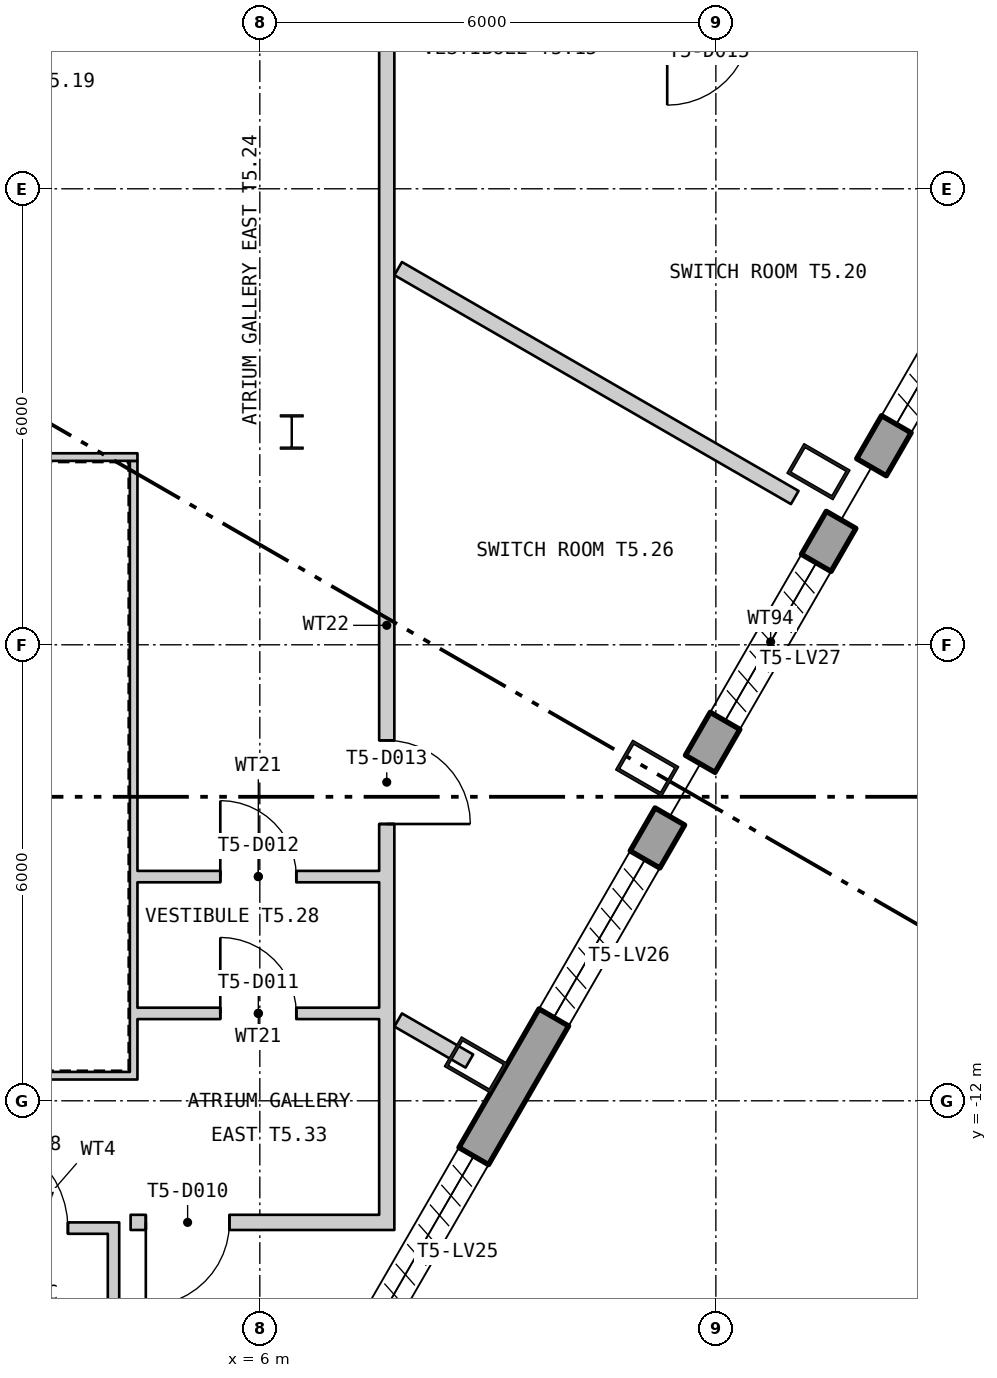
"""IFC4 building model, lengths in metres.
Left out: names, types, materials, properties, quantities, classifications, styles, units other than length and angle.
Written with IfcOpenShell. Run it as: python <this file> out.ifc"""

import sys

from ifc_helpers import new_model, si_unit, direction, frame, frame_2d, origin, origin_2d, place, context, subcontext, project, spatial, polyline, rectangle, hollow_rectangle, i_section, outline, extrude, element, fill, save


model = new_model("IFC4")
c1 = context("Model", 3, precision=1e-05, world=origin(), true_north=direction((0.0, 1.0)))
c2 = subcontext(c1, "Body", "Model", "MODEL_VIEW")
j1 = project(units=[si_unit("LENGTHUNIT", "METRE"), si_unit("PLANEANGLEUNIT", "RADIAN")], contexts=[c1])
p1 = place(None, origin())
s1 = spatial("IfcSite", under=j1, at=p1, CompositionType="ELEMENT")
p2 = place(p1, origin())
s2 = spatial("IfcBuilding", under=s1, at=p2, CompositionType="ELEMENT")
p3 = place(p2, frame((0.0, 0.0, 292.2)))
s3 = spatial("IfcBuildingStorey", under=s2, at=p3, CompositionType="ELEMENT", Elevation=292.2)
for number, where, z_axis, x_axis in (
    (1, (8.843, -11.528, 0.0), (0.0, 0.0, 1.0), (0.5, 0.866, 0.0)),
    (2, (11.096, -7.625, 0.0), (0.0, 0.0, 1.0), (0.5, 0.866, 0.0)),
    (3, (13.35, -3.722, 0.0), (0.0, 0.0, 1.0), (0.5, 0.866, 0.0)),
):
    element("IfcColumn", number, at=place(p3, frame(where, z_axis=z_axis, x_axis=x_axis)), inside=s3, PredefinedType="COLUMN", context=c2, shape_type="SweptSolid", body=[
        extrude(hollow_rectangle(XDim=0.45, YDim=0.7, WallThickness=0.04, at=origin_2d()), origin(), (0.0, 0.0, 1.0), 6.0),
    ])
p4 = place(p3, frame((6.42, -3.2, 0.0), z_axis=(0.0, 0.0, 1.0), x_axis=(1.0, 0.0, 0.0)))
e4 = element("IfcColumn", 4, at=p4, inside=s3, PredefinedType="COLUMN", context=c2, shape_type="SweptSolid", body=[
    extrude(i_section(OverallWidth=0.3, OverallDepth=0.45, WebThickness=0.014, FlangeThickness=0.026, at=origin_2d()), origin(), (0.0, 0.0, 1.0), 6.0),
])
p5 = place(p3, frame((2.415, -23.812, -0.18), z_axis=(0.0, 0.0, 1.0), x_axis=(0.499998326906, 0.866026369744, 0.0)))
e5 = element("IfcWall", 5, at=p5, inside=s3, PredefinedType="SOLIDWALL", context=c2, shape_type="SweptSolid", body=[
    extrude(outline(polyline([(-0.13, -0.225), (17.959, -0.225), (17.959, 0.225), (0.13, 0.225), (-0.13, -0.225)])), origin(), (0.0, 0.0, 1.0), 5.9),
])
p6 = place(p5, frame((1.424, 0.0, 1.38)))
e6 = element("IfcOpeningElement", 6, at=p6, cuts=e5, PredefinedType="OPENING", context=c2, shape_type="SweptSolid", body=[
    extrude(rectangle(XDim=2.4, YDim=3.6, at=frame_2d((1.2, 1.8))), frame((0.0, 0.235, 0.0), z_axis=(0.0, -1.0, 0.0), x_axis=(1.0, 0.0, 0.0)), (0.0, 0.0, 1.0), 0.47),
])
p7 = place(p5, frame((5.892, 0.0, 1.38)))
e7 = element("IfcOpeningElement", 7, at=p7, cuts=e5, PredefinedType="OPENING", context=c2, shape_type="SweptSolid", body=[
    extrude(rectangle(XDim=2.4, YDim=3.6, at=frame_2d((1.2, 1.8))), frame((0.0, 0.235, 0.0), z_axis=(0.0, -1.0, 0.0), x_axis=(1.0, 0.0, 0.0)), (0.0, 0.0, 1.0), 0.47),
])
p8 = place(p5, frame((10.399, 0.0, 1.38)))
e8 = element("IfcOpeningElement", 8, at=p8, cuts=e5, PredefinedType="OPENING", context=c2, shape_type="SweptSolid", body=[
    extrude(rectangle(XDim=2.4, YDim=3.6, at=frame_2d((1.2, 1.8))), frame((0.0, 0.235, 0.0), z_axis=(0.0, -1.0, 0.0), x_axis=(1.0, 0.0, 0.0)), (0.0, 0.0, 1.0), 0.47),
])
p9 = place(p5, frame((14.905, 0.0, 1.38)))
e9 = element("IfcOpeningElement", 9, at=p9, cuts=e5, PredefinedType="OPENING", context=c2, shape_type="SweptSolid", body=[
    extrude(rectangle(XDim=2.4, YDim=3.6, at=frame_2d((1.2, 1.8))), frame((0.0, 0.235, 0.0), z_axis=(0.0, -1.0, 0.0), x_axis=(1.0, 0.0, 0.0)), (0.0, 0.0, 1.0), 0.47),
])
p10 = place(p3, frame((11.794, -7.566, -0.18), z_axis=(0.0, 0.0, 1.0), x_axis=(0.50000114038, 0.866024745385, 0.0)))
e10 = element("IfcWall", 10, at=p10, inside=s3, PredefinedType="SOLIDWALL", context=c2, shape_type="SweptSolid", body=[
    extrude(outline(polyline([(0.0, -0.225), (3.707, -0.225), (3.707, 0.225), (0.0, 0.225), (0.0, -0.225)])), origin(), (0.0, 0.0, 1.0), 5.9),
])
p11 = place(p10, frame((0.653, 0.0, 1.38)))
e11 = element("IfcOpeningElement", 11, at=p11, cuts=e10, PredefinedType="OPENING", context=c2, shape_type="SweptSolid", body=[
    extrude(rectangle(XDim=2.4, YDim=3.6, at=frame_2d((1.2, 1.8))), frame((0.0, 0.235, 0.0), z_axis=(0.0, -1.0, 0.0), x_axis=(1.0, 0.0, 0.0)), (0.0, 0.0, 1.0), 0.47),
])
p12 = place(p3, frame((14.048, -3.663, -0.18), z_axis=(0.0, 0.0, 1.0), x_axis=(0.500002580931, 0.866023913678, 0.0)))
e12 = element("IfcWall", 12, at=p12, inside=s3, PredefinedType="SOLIDWALL", context=c2, shape_type="SweptSolid", body=[
    extrude(outline(polyline([(0.0, -0.225), (22.595, -0.225), (22.335, 0.225), (0.0, 0.225), (0.0, -0.225)])), origin(), (0.0, 0.0, 1.0), 5.9),
])
p13 = place(p12, frame((0.653, 0.0, 1.38)))
e13 = element("IfcOpeningElement", 13, at=p13, cuts=e12, PredefinedType="OPENING", context=c2, shape_type="SweptSolid", body=[
    extrude(rectangle(XDim=2.4, YDim=3.6, at=frame_2d((1.2, 1.8))), frame((0.0, 0.235, 0.0), z_axis=(0.0, -1.0, 0.0), x_axis=(1.0, 0.0, 0.0)), (0.0, 0.0, 1.0), 0.47),
])
p14 = place(p12, frame((5.16, 0.0, 1.38)))
e14 = element("IfcOpeningElement", 14, at=p14, cuts=e12, PredefinedType="OPENING", context=c2, shape_type="SweptSolid", body=[
    extrude(rectangle(XDim=2.4, YDim=3.6, at=frame_2d((1.2, 1.8))), frame((0.0, 0.235, 0.0), z_axis=(0.0, -1.0, 0.0), x_axis=(1.0, 0.0, 0.0)), (0.0, 0.0, 1.0), 0.47),
])
p15 = place(p12, frame((9.667, 0.0, 1.38)))
e15 = element("IfcOpeningElement", 15, at=p15, cuts=e12, PredefinedType="OPENING", context=c2, shape_type="SweptSolid", body=[
    extrude(rectangle(XDim=2.4, YDim=3.6, at=frame_2d((1.2, 1.8))), frame((0.0, 0.235, 0.0), z_axis=(0.0, -1.0, 0.0), x_axis=(1.0, 0.0, 0.0)), (0.0, 0.0, 1.0), 0.47),
])
p16 = place(p12, frame((14.173, 0.0, 1.38)))
e16 = element("IfcOpeningElement", 16, at=p16, cuts=e12, PredefinedType="OPENING", context=c2, shape_type="SweptSolid", body=[
    extrude(rectangle(XDim=2.4, YDim=3.6, at=frame_2d((1.2, 1.8))), frame((0.0, 0.235, 0.0), z_axis=(0.0, -1.0, 0.0), x_axis=(1.0, 0.0, 0.0)), (0.0, 0.0, 1.0), 0.47),
])
p17 = place(p12, frame((18.641, 0.0, 1.38)))
e17 = element("IfcOpeningElement", 17, at=p17, cuts=e12, PredefinedType="OPENING", context=c2, shape_type="SweptSolid", body=[
    extrude(rectangle(XDim=2.4, YDim=3.6, at=frame_2d((1.2, 1.8))), frame((0.0, 0.235, 0.0), z_axis=(0.0, -1.0, 0.0), x_axis=(1.0, 0.0, 0.0)), (0.0, 0.0, 1.0), 0.47),
])
p18 = place(p3, frame((-4.39, -11.67, 0.0), z_axis=(0.0, 0.0, 1.0), x_axis=(1.0, 0.0, 0.0)))
e18 = element("IfcWall", 18, at=p18, inside=s3, PredefinedType="PARTITIONING", context=c2, shape_type="SweptSolid", body=[
    extrude(rectangle(XDim=8.78, YDim=0.1, at=frame_2d((4.39, 0.0))), origin(), (0.0, 0.0, 1.0), 5.7),
])
p19 = place(p3, frame((4.34, -11.62, 0.0), z_axis=(0.0, 0.0, 1.0), x_axis=(0.0, 1.0, 0.0)))
e19 = element("IfcWall", 19, at=p19, inside=s3, PredefinedType="PARTITIONING", context=c2, shape_type="SweptSolid", body=[
    extrude(rectangle(XDim=8.04, YDim=0.1, at=frame_2d((4.02, 0.0))), origin(), (0.0, 0.0, 1.0), 5.7),
])
p20 = place(p3, frame((4.39, -3.53, 0.0), z_axis=(0.0, 0.0, 1.0), x_axis=(-1.0, 0.0, 0.0)))
e20 = element("IfcWall", 20, at=p20, inside=s3, PredefinedType="PARTITIONING", context=c2, shape_type="SweptSolid", body=[
    extrude(rectangle(XDim=8.78, YDim=0.1, at=frame_2d((4.39, 0.0))), origin(), (0.0, 0.0, 1.0), 5.7),
])
p21 = place(p3, frame((4.075, -16.15, 0.0), z_axis=(0.0, 0.0, 1.0), x_axis=(0.0, 1.0, 0.0)))
e21 = element("IfcWall", 21, at=p21, inside=s3, PredefinedType="PARTITIONING", context=c2, shape_type="SweptSolid", body=[
    extrude(rectangle(XDim=2.4, YDim=0.15, at=frame_2d((1.2, 0.0))), origin(), (0.0, 0.0, 1.0), 5.7),
])
p22 = place(p3, frame((1.55, -13.675, 0.0), z_axis=(0.0, 0.0, 1.0), x_axis=(1.0, 0.0, 0.0)))
e22 = element("IfcWall", 22, at=p22, inside=s3, PredefinedType="PARTITIONING", context=c2, shape_type="SweptSolid", body=[
    extrude(rectangle(XDim=2.6, YDim=0.15, at=frame_2d((1.3, 0.0))), origin(), (0.0, 0.0, 1.0), 4.79),
])
p23 = place(p22, frame((0.675, 0.0, 0.0)))
e23 = element("IfcOpeningElement", 23, at=p23, cuts=e22, PredefinedType="OPENING", context=c2, shape_type="SweptSolid", body=[
    extrude(rectangle(XDim=1.25, YDim=2.1, at=frame_2d((0.625, 1.05))), frame((0.0, 0.085, 0.0), z_axis=(0.0, -1.0, 0.0), x_axis=(1.0, 0.0, 0.0)), (0.0, 0.0, 1.0), 0.17),
])
p24 = place(p3, frame((4.3, -13.6, 0.0), z_axis=(0.0, 0.0, 1.0), x_axis=(1.0, 0.0, 0.0)))
e24 = element("IfcWall", 24, at=p24, inside=s3, PredefinedType="PARTITIONING", context=c2, shape_type="SweptSolid", body=[
    extrude(rectangle(XDim=3.27, YDim=0.2, at=frame_2d((1.635, 0.0))), origin(), (0.0, 0.0, 1.0), 4.79),
])
p25 = place(p24, frame((0.2, 0.0, 0.0)))
e25 = element("IfcOpeningElement", 25, at=p25, cuts=e24, PredefinedType="OPENING", context=c2, shape_type="SweptSolid", body=[
    extrude(rectangle(XDim=1.1, YDim=2.1, at=frame_2d((0.55, 1.05))), frame((0.0, 0.11, 0.0), z_axis=(0.0, -1.0, 0.0), x_axis=(1.0, 0.0, 0.0)), (0.0, 0.0, 1.0), 0.22),
])
p26 = place(p3, frame((4.39, -10.85, 0.0), z_axis=(0.0, 0.0, 1.0), x_axis=(1.0, 0.0, 0.0)))
e26 = element("IfcWall", 26, at=p26, inside=s3, PredefinedType="PARTITIONING", context=c2, shape_type="SweptSolid", body=[
    extrude(rectangle(XDim=3.18, YDim=0.15, at=frame_2d((1.59, 0.0))), origin(), (0.0, 0.0, 1.0), 5.7),
])
p27 = place(p26, frame((1.09, 0.0, 0.0)))
e27 = element("IfcOpeningElement", 27, at=p27, cuts=e26, PredefinedType="OPENING", context=c2, shape_type="SweptSolid", body=[
    extrude(rectangle(XDim=1.0, YDim=2.1, at=frame_2d((0.5, 1.05))), frame((0.0, 0.085, 0.0), z_axis=(0.0, -1.0, 0.0), x_axis=(1.0, 0.0, 0.0)), (0.0, 0.0, 1.0), 0.17),
])
p28 = place(p3, frame((4.39, -9.05, 0.0), z_axis=(0.0, 0.0, 1.0), x_axis=(1.0, 0.0, 0.0)))
e28 = element("IfcWall", 28, at=p28, inside=s3, PredefinedType="PARTITIONING", context=c2, shape_type="SweptSolid", body=[
    extrude(rectangle(XDim=3.18, YDim=0.15, at=frame_2d((1.59, 0.0))), origin(), (0.0, 0.0, 1.0), 5.7),
])
p29 = place(p28, frame((1.09, 0.0, 0.0)))
e29 = element("IfcOpeningElement", 29, at=p29, cuts=e28, PredefinedType="OPENING", context=c2, shape_type="SweptSolid", body=[
    extrude(rectangle(XDim=1.0, YDim=2.1, at=frame_2d((0.5, 1.05))), frame((0.0, 0.085, 0.0), z_axis=(0.0, -1.0, 0.0), x_axis=(1.0, 0.0, 0.0)), (0.0, 0.0, 1.0), 0.17),
])
p30 = place(p3, frame((7.67, -13.7, 0.0), z_axis=(0.0, 0.0, 1.0), x_axis=(0.0, 1.0, 0.0)))
e30 = element("IfcWall", 30, at=p30, inside=s3, PredefinedType="PARTITIONING", context=c2, shape_type="SweptSolid", body=[
    extrude(rectangle(XDim=15.912, YDim=0.2, at=frame_2d((7.956, 0.0))), origin(), (0.0, 0.0, 1.0), 5.7),
])
p31 = place(p30, frame((5.342, 0.0, 0.0)))
e31 = element("IfcOpeningElement", 31, at=p31, cuts=e30, PredefinedType="OPENING", context=c2, shape_type="SweptSolid", body=[
    extrude(rectangle(XDim=1.1, YDim=2.1, at=frame_2d((0.55, 1.05))), frame((0.0, 0.11, 0.0), z_axis=(0.0, -1.0, 0.0), x_axis=(1.0, 0.0, 0.0)), (0.0, 0.0, 1.0), 0.22),
])
p32 = place(p3, frame((7.82, -10.937, 0.0), z_axis=(0.0, 0.0, 1.0), x_axis=(0.866416404672, -0.49932215424, 0.0)))
e32 = element("IfcWall", 32, at=p32, inside=s3, PredefinedType="PARTITIONING", context=c2, shape_type="SweptSolid", body=[
    extrude(rectangle(XDim=1.081, YDim=0.2, at=frame_2d((0.541, 0.0))), origin(), (0.0, 0.0, 1.0), 5.7),
])
p33 = place(p3, frame((7.82, -1.05, 0.0), z_axis=(0.0, 0.0, 1.0), x_axis=(0.866069507536, -0.49992360228, 0.0)))
e33 = element("IfcWall", 33, at=p33, inside=s3, PredefinedType="PARTITIONING", context=c2, shape_type="SweptSolid", body=[
    extrude(rectangle(XDim=6.025, YDim=0.2, at=frame_2d((3.012, 0.0))), origin(), (0.0, 0.0, 1.0), 5.7),
])
p34 = place(p23, origin())
e34 = element("IfcDoor", 34, at=p34, inside=s3, OperationType="SINGLE_SWING_RIGHT", PredefinedType="DOOR", context=c2, shape_type="SweptSolid", body=[
    extrude(rectangle(XDim=1.25, YDim=2.1, at=frame_2d((0.625, 1.05))), frame((0.0, 0.025, 0.0), z_axis=(0.0, -1.0, 0.0), x_axis=(1.0, 0.0, 0.0)), (0.0, 0.0, 1.0), 0.05),
])
fill(e23, e34)
p35 = place(p25, origin())
e35 = element("IfcDoor", 35, at=p35, inside=s3, OperationType="SINGLE_SWING_LEFT", PredefinedType="DOOR", context=c2, shape_type="SweptSolid", body=[
    extrude(rectangle(XDim=1.1, YDim=2.1, at=frame_2d((0.55, 1.05))), frame((0.0, 0.025, 0.0), z_axis=(0.0, -1.0, 0.0), x_axis=(1.0, 0.0, 0.0)), (0.0, 0.0, 1.0), 0.05),
])
fill(e25, e35)
p36 = place(p27, origin())
e36 = element("IfcDoor", 36, at=p36, inside=s3, OperationType="SINGLE_SWING_RIGHT", PredefinedType="DOOR", context=c2, shape_type="SweptSolid", body=[
    extrude(rectangle(XDim=1.0, YDim=2.1, at=frame_2d((0.5, 1.05))), frame((0.0, 0.025, 0.0), z_axis=(0.0, -1.0, 0.0), x_axis=(1.0, 0.0, 0.0)), (0.0, 0.0, 1.0), 0.05),
])
fill(e27, e36)
p37 = place(p29, origin())
e37 = element("IfcDoor", 37, at=p37, inside=s3, OperationType="SINGLE_SWING_RIGHT", PredefinedType="DOOR", context=c2, shape_type="SweptSolid", body=[
    extrude(rectangle(XDim=1.0, YDim=2.1, at=frame_2d((0.5, 1.05))), frame((0.0, 0.025, 0.0), z_axis=(0.0, -1.0, 0.0), x_axis=(1.0, 0.0, 0.0)), (0.0, 0.0, 1.0), 0.05),
])
fill(e29, e37)
p38 = place(p31, origin())
e38 = element("IfcDoor", 38, at=p38, inside=s3, OperationType="SINGLE_SWING_LEFT", PredefinedType="DOOR", context=c2, shape_type="SweptSolid", body=[
    extrude(rectangle(XDim=1.1, YDim=2.1, at=frame_2d((0.55, 1.05))), frame((0.0, 0.025, 0.0), z_axis=(0.0, -1.0, 0.0), x_axis=(1.0, 0.0, 0.0)), (0.0, 0.0, 1.0), 0.05),
])
fill(e31, e38)
save(model, sys.argv[1])
